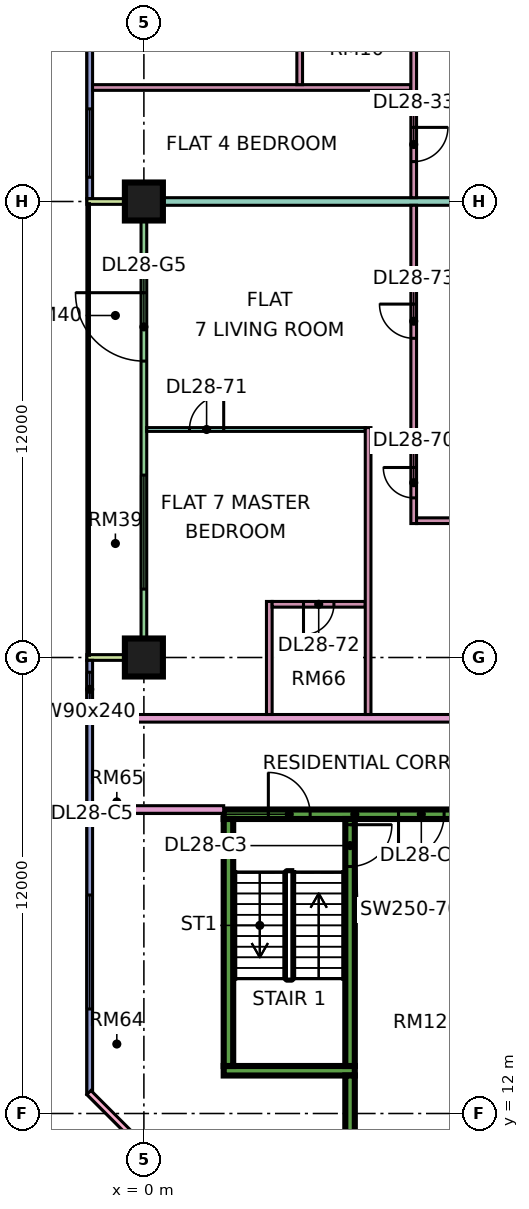
"""IFC4 building model, lengths in metres.
Left out: names, types, materials, properties, quantities, classifications, styles, units other than length and angle.
Written with IfcOpenShell. Run it as: python <this file> out.ifc"""

import sys

from ifc_helpers import new_model, si_unit, direction, frame, frame_2d, origin, origin_2d, place, context, subcontext, project, spatial, rectangle, extrude, element, fill, save


model = new_model("IFC4")
c1 = context("Model", 3, precision=1e-05, world=origin(), true_north=direction((0.0, 1.0)))
c2 = subcontext(c1, "Body", "Model", "MODEL_VIEW")
j1 = project(units=[si_unit("LENGTHUNIT", "METRE"), si_unit("PLANEANGLEUNIT", "RADIAN")], contexts=[c1])
p1 = place(None, origin())
s1 = spatial("IfcSite", under=j1, at=p1, CompositionType="ELEMENT")
p2 = place(p1, origin())
s2 = spatial("IfcBuilding", under=s1, at=p2, CompositionType="ELEMENT")
p3 = place(p2, frame((0.0, 0.0, 121.9)))
s3 = spatial("IfcBuildingStorey", under=s2, at=p3, CompositionType="ELEMENT", Elevation=121.9)
p4 = place(p3, frame((0.0, 24.0, 0.0), z_axis=(0.0, 0.0, 1.0), x_axis=(1.0, 0.0, 0.0)))
e1 = element("IfcColumn", 1, at=p4, inside=s3, PredefinedType="COLUMN", context=c2, shape_type="SweptSolid", body=[
    extrude(rectangle(XDim=1.0, YDim=1.0, at=origin_2d()), origin(), (0.0, 0.0, 1.0), 3.75),
])
p5 = place(p3, frame((0.0, 36.0, 0.0), z_axis=(0.0, 0.0, 1.0), x_axis=(1.0, 0.0, 0.0)))
e2 = element("IfcColumn", 2, at=p5, inside=s3, PredefinedType="COLUMN", context=c2, shape_type="SweptSolid", body=[
    extrude(rectangle(XDim=1.0, YDim=1.0, at=origin_2d()), origin(), (0.0, 0.0, 1.0), 3.75),
])
p6 = place(p3, frame((2.1, 19.875, 0.0), z_axis=(0.0, 0.0, 1.0), x_axis=(1.0, 0.0, 0.0)))
e3 = element("IfcWall", 3, at=p6, inside=s3, PredefinedType="SHEAR", context=c2, shape_type="SweptSolid", body=[
    extrude(rectangle(XDim=6.9, YDim=0.25, at=frame_2d((3.45, 0.0))), origin(), (0.0, 0.0, 1.0), 3.75),
])
p7 = place(p6, frame((1.175, 0.0, 0.0)))
e4 = element("IfcOpeningElement", 4, at=p7, cuts=e3, PredefinedType="OPENING", context=c2, shape_type="SweptSolid", body=[
    extrude(rectangle(XDim=1.1, YDim=2.2, at=frame_2d((0.55, 1.1))), frame((0.0, 0.135, 0.0), z_axis=(0.0, -1.0, 0.0), x_axis=(1.0, 0.0, 0.0)), (0.0, 0.0, 1.0), 0.27),
])
p8 = place(p6, frame((4.6, 0.0, 0.0)))
e5 = element("IfcOpeningElement", 5, at=p8, cuts=e3, PredefinedType="OPENING", context=c2, shape_type="SweptSolid", body=[
    extrude(rectangle(XDim=1.2, YDim=2.2, at=frame_2d((0.6, 1.1))), frame((0.0, 0.135, 0.0), z_axis=(0.0, -1.0, 0.0), x_axis=(1.0, 0.0, 0.0)), (0.0, 0.0, 1.0), 0.27),
])
p9 = place(p3, frame((2.1, 13.125, 0.0), z_axis=(0.0, 0.0, 1.0), x_axis=(1.0, 0.0, 0.0)))
e6 = element("IfcWall", 6, at=p9, inside=s3, PredefinedType="SHEAR", context=c2, shape_type="SweptSolid", body=[
    extrude(rectangle(XDim=3.45, YDim=0.25, at=frame_2d((1.725, 0.0))), origin(), (0.0, 0.0, 1.0), 3.75),
])
p10 = place(p3, frame((2.225, 13.25, 0.0), z_axis=(0.0, 0.0, 1.0), x_axis=(0.0, 1.0, 0.0)))
e7 = element("IfcWall", 7, at=p10, inside=s3, PredefinedType="SHEAR", context=c2, shape_type="SweptSolid", body=[
    extrude(rectangle(XDim=6.5, YDim=0.25, at=frame_2d((3.25, 0.0))), origin(), (0.0, 0.0, 1.0), 3.75),
])
p11 = place(p3, frame((5.425, 13.25, 0.0), z_axis=(0.0, 0.0, 1.0), x_axis=(0.0, 1.0, 0.0)))
e8 = element("IfcWall", 8, at=p11, inside=s3, PredefinedType="SHEAR", context=c2, shape_type="SweptSolid", body=[
    extrude(rectangle(XDim=6.5, YDim=0.25, at=frame_2d((3.25, 0.0))), origin(), (0.0, 0.0, 1.0), 3.75),
])
p12 = place(p11, frame((5.25, 0.0, 0.0)))
e9 = element("IfcOpeningElement", 9, at=p12, cuts=e8, PredefinedType="OPENING", context=c2, shape_type="SweptSolid", body=[
    extrude(rectangle(XDim=1.1, YDim=2.2, at=frame_2d((0.55, 1.1))), frame((0.0, 0.135, 0.0), z_axis=(0.0, -1.0, 0.0), x_axis=(1.0, 0.0, 0.0)), (0.0, 0.0, 1.0), 0.27),
])
p13 = place(p3, frame((5.425, 9.0, 0.0), z_axis=(0.0, 0.0, 1.0), x_axis=(0.0, 1.0, 0.0)))
e10 = element("IfcWall", 10, at=p13, inside=s3, PredefinedType="SHEAR", context=c2, shape_type="SweptSolid", body=[
    extrude(rectangle(XDim=4.0, YDim=0.25, at=frame_2d((2.0, 0.0))), origin(), (0.0, 0.0, 1.0), 3.75),
])
p14 = place(p3, frame((-1.425, 47.925, 0.0), z_axis=(0.0, 0.0, 1.0), x_axis=(0.0, -1.0, 0.0)))
e11 = element("IfcWall", 11, at=p14, inside=s3, PredefinedType="SOLIDWALL", context=c2, shape_type="SweptSolid", body=[
    extrude(rectangle(XDim=11.85, YDim=0.15, at=frame_2d((5.925, 0.0))), origin(), (0.0, 0.0, 1.0), 3.35),
])
p15 = place(p14, frame((0.562, 0.0, 0.45)))
e12 = element("IfcOpeningElement", 12, at=p15, cuts=e11, PredefinedType="OPENING", context=c2, shape_type="SweptSolid", body=[
    extrude(rectangle(XDim=1.8, YDim=2.4, at=frame_2d((0.9, 1.2))), frame((0.0, 0.085, 0.0), z_axis=(0.0, -1.0, 0.0), x_axis=(1.0, 0.0, 0.0)), (0.0, 0.0, 1.0), 0.17),
])
p16 = place(p14, frame((4.425, 0.0, 0.45)))
e13 = element("IfcOpeningElement", 13, at=p16, cuts=e11, PredefinedType="OPENING", context=c2, shape_type="SweptSolid", body=[
    extrude(rectangle(XDim=3.0, YDim=2.4, at=frame_2d((1.5, 1.2))), frame((0.0, 0.085, 0.0), z_axis=(0.0, -1.0, 0.0), x_axis=(1.0, 0.0, 0.0)), (0.0, 0.0, 1.0), 0.17),
])
p17 = place(p14, frame((9.488, 0.0, 0.45)))
e14 = element("IfcOpeningElement", 14, at=p17, cuts=e11, PredefinedType="OPENING", context=c2, shape_type="SweptSolid", body=[
    extrude(rectangle(XDim=1.8, YDim=2.4, at=frame_2d((0.9, 1.2))), frame((0.0, 0.085, 0.0), z_axis=(0.0, -1.0, 0.0), x_axis=(1.0, 0.0, 0.0)), (0.0, 0.0, 1.0), 0.17),
])
p18 = place(p3, frame((0.0, 35.925, 0.0), z_axis=(0.0, 0.0, 1.0), x_axis=(0.0, -1.0, 0.0)))
e15 = element("IfcWall", 15, at=p18, inside=s3, PredefinedType="SOLIDWALL", context=c2, shape_type="SweptSolid", body=[
    extrude(rectangle(XDim=11.85, YDim=0.15, at=frame_2d((5.925, 0.0))), origin(), (0.0, 0.0, 1.0), 3.35),
])
p19 = place(p18, frame((2.325, 0.0, 0.0)))
e16 = element("IfcOpeningElement", 16, at=p19, cuts=e15, PredefinedType="OPENING", context=c2, shape_type="SweptSolid", body=[
    extrude(rectangle(XDim=1.8, YDim=2.4, at=frame_2d((0.9, 1.2))), frame((0.0, 0.085, 0.0), z_axis=(0.0, -1.0, 0.0), x_axis=(1.0, 0.0, 0.0)), (0.0, 0.0, 1.0), 0.17),
])
p20 = place(p18, frame((7.125, 0.0, 0.45)))
e17 = element("IfcOpeningElement", 17, at=p20, cuts=e15, PredefinedType="OPENING", context=c2, shape_type="SweptSolid", body=[
    extrude(rectangle(XDim=3.0, YDim=2.4, at=frame_2d((1.5, 1.2))), frame((0.0, 0.085, 0.0), z_axis=(0.0, -1.0, 0.0), x_axis=(1.0, 0.0, 0.0)), (0.0, 0.0, 1.0), 0.17),
])
for number, where, z_axis, x_axis in (
    (18, (-1.5, 36.0, 0.0), (0.0, 0.0, 1.0), (1.0, 0.0, 0.0)),
    (19, (-1.5, 24.0, 0.0), (0.0, 0.0, 1.0), (1.0, 0.0, 0.0)),
):
    element("IfcWall", number, at=place(p3, frame(where, z_axis=z_axis, x_axis=x_axis)), inside=s3, PredefinedType="SOLIDWALL", context=c2, shape_type="SweptSolid", body=[
        extrude(rectangle(XDim=1.5, YDim=0.15, at=frame_2d((0.75, 0.0))), origin(), (0.0, 0.0, 1.0), 3.35),
    ])
p21 = place(p3, frame((-1.425, 23.925, 0.0), z_axis=(0.0, 0.0, 1.0), x_axis=(0.0, -1.0, 0.0)))
e20 = element("IfcWall", 20, at=p21, inside=s3, PredefinedType="SOLIDWALL", context=c2, shape_type="SweptSolid", body=[
    extrude(rectangle(XDim=11.425, YDim=0.15, at=frame_2d((5.712, 0.0))), origin(), (0.0, 0.0, 1.0), 3.35),
])
p22 = place(p21, frame((0.312, 0.0, 0.45)))
e21 = element("IfcOpeningElement", 21, at=p22, cuts=e20, PredefinedType="OPENING", context=c2, shape_type="SweptSolid", body=[
    extrude(rectangle(XDim=0.9, YDim=2.4, at=frame_2d((0.45, 1.2))), frame((0.0, 0.085, 0.0), z_axis=(0.0, -1.0, 0.0), x_axis=(1.0, 0.0, 0.0)), (0.0, 0.0, 1.0), 0.17),
])
p23 = place(p21, frame((6.175, 0.0, 0.45)))
e22 = element("IfcOpeningElement", 22, at=p23, cuts=e20, PredefinedType="OPENING", context=c2, shape_type="SweptSolid", body=[
    extrude(rectangle(XDim=3.0, YDim=2.4, at=frame_2d((1.5, 1.2))), frame((0.0, 0.085, 0.0), z_axis=(0.0, -1.0, 0.0), x_axis=(1.0, 0.0, 0.0)), (0.0, 0.0, 1.0), 0.17),
])
p24 = place(p3, frame((-1.447, 12.553, 0.0), z_axis=(0.0, 0.0, 1.0), x_axis=(0.707106781187, -0.707106781187, 0.0)))
e23 = element("IfcWall", 23, at=p24, inside=s3, PredefinedType="SOLIDWALL", context=c2, shape_type="SweptSolid", body=[
    extrude(rectangle(XDim=19.799, YDim=0.15, at=frame_2d((9.899, 0.0))), origin(), (0.0, 0.0, 1.0), 3.35),
])
p25 = place(p24, frame((2.212, 0.0, 0.45)))
e24 = element("IfcOpeningElement", 24, at=p25, cuts=e23, PredefinedType="OPENING", context=c2, shape_type="SweptSolid", body=[
    extrude(rectangle(XDim=3.0, YDim=2.4, at=frame_2d((1.5, 1.2))), frame((0.0, 0.085, 0.0), z_axis=(0.0, -1.0, 0.0), x_axis=(1.0, 0.0, 0.0)), (0.0, 0.0, 1.0), 0.17),
])
p26 = place(p24, frame((10.216, 0.0, 0.45)))
e25 = element("IfcOpeningElement", 25, at=p26, cuts=e23, PredefinedType="OPENING", context=c2, shape_type="SweptSolid", body=[
    extrude(rectangle(XDim=3.0, YDim=2.4, at=frame_2d((1.5, 1.2))), frame((0.0, 0.085, 0.0), z_axis=(0.0, -1.0, 0.0), x_axis=(1.0, 0.0, 0.0)), (0.0, 0.0, 1.0), 0.17),
])
p27 = place(p3, frame((-1.351, 39.0, 0.0), z_axis=(0.0, 0.0, 1.0), x_axis=(1.0, 0.0, 0.0)))
e26 = element("IfcWall", 26, at=p27, inside=s3, PredefinedType="PARTITIONING", context=c2, shape_type="SweptSolid", body=[
    extrude(rectangle(XDim=8.376, YDim=0.15, at=frame_2d((4.188, 0.0))), origin(), (0.0, 0.0, 1.0), 3.35),
])
p28 = place(p3, frame((-1.35, 20.0, 0.0), z_axis=(0.0, 0.0, 1.0), x_axis=(1.0, 0.0, 0.0)))
e27 = element("IfcWall", 27, at=p28, inside=s3, PredefinedType="PARTITIONING", context=c2, shape_type="SweptSolid", body=[
    extrude(rectangle(XDim=3.45, YDim=0.2, at=frame_2d((1.725, 0.0))), origin(), (0.0, 0.0, 1.0), 3.35),
])
p29 = place(p3, frame((-1.35, 22.4, 0.0), z_axis=(0.0, 0.0, 1.0), x_axis=(1.0, 0.0, 0.0)))
e28 = element("IfcWall", 28, at=p29, inside=s3, PredefinedType="PARTITIONING", context=c2, shape_type="SweptSolid", body=[
    extrude(rectangle(XDim=13.75, YDim=0.2, at=frame_2d((6.875, 0.0))), origin(), (0.0, 0.0, 1.0), 3.35),
])
e29 = element("IfcWall", 29, at=p5, inside=s3, PredefinedType="PARTITIONING", context=c2, shape_type="SweptSolid", body=[
    extrude(rectangle(XDim=12.4, YDim=0.2, at=frame_2d((6.2, 0.0))), origin(), (0.0, 0.0, 1.0), 3.35),
])
p30 = place(p3, frame((0.074, 30.0, 0.0), z_axis=(0.0, 0.0, 1.0), x_axis=(1.0, 0.0, 0.0)))
e30 = element("IfcWall", 30, at=p30, inside=s3, PredefinedType="PARTITIONING", context=c2, shape_type="SweptSolid", body=[
    extrude(rectangle(XDim=5.751, YDim=0.1, at=frame_2d((2.875, 0.0))), origin(), (0.0, 0.0, 1.0), 3.35),
])
p31 = place(p30, frame((1.126, 0.0, 0.0)))
e31 = element("IfcOpeningElement", 31, at=p31, cuts=e30, PredefinedType="OPENING", context=c2, shape_type="SweptSolid", body=[
    extrude(rectangle(XDim=0.9, YDim=2.1, at=frame_2d((0.45, 1.05))), frame((0.0, 0.06, 0.0), z_axis=(0.0, -1.0, 0.0), x_axis=(1.0, 0.0, 0.0)), (0.0, 0.0, 1.0), 0.12),
])
p32 = place(p3, frame((3.3, 22.5, 0.0), z_axis=(0.0, 0.0, 1.0), x_axis=(0.0, 1.0, 0.0)))
e32 = element("IfcWall", 32, at=p32, inside=s3, PredefinedType="PARTITIONING", context=c2, shape_type="SweptSolid", body=[
    extrude(rectangle(XDim=2.975, YDim=0.15, at=frame_2d((1.488, 0.0))), origin(), (0.0, 0.0, 1.0), 3.35),
])
p33 = place(p3, frame((3.375, 25.4, 0.0), z_axis=(0.0, 0.0, 1.0), x_axis=(1.0, 0.0, 0.0)))
e33 = element("IfcWall", 33, at=p33, inside=s3, PredefinedType="PARTITIONING", context=c2, shape_type="SweptSolid", body=[
    extrude(rectangle(XDim=2.45, YDim=0.15, at=frame_2d((1.225, 0.0))), origin(), (0.0, 0.0, 1.0), 3.35),
])
p34 = place(p33, frame((0.825, 0.0, 0.0)))
e34 = element("IfcOpeningElement", 34, at=p34, cuts=e33, PredefinedType="OPENING", context=c2, shape_type="SweptSolid", body=[
    extrude(rectangle(XDim=0.8, YDim=2.1, at=frame_2d((0.4, 1.05))), frame((0.0, 0.085, 0.0), z_axis=(0.0, -1.0, 0.0), x_axis=(1.0, 0.0, 0.0)), (0.0, 0.0, 1.0), 0.17),
])
p35 = place(p3, frame((4.1, 39.075, 0.0), z_axis=(0.0, 0.0, 1.0), x_axis=(0.0, 1.0, 0.0)))
e35 = element("IfcWall", 35, at=p35, inside=s3, PredefinedType="PARTITIONING", context=c2, shape_type="SweptSolid", body=[
    extrude(rectangle(XDim=3.0, YDim=0.15, at=frame_2d((1.5, 0.0))), origin(), (0.0, 0.0, 1.0), 3.35),
])
p36 = place(p3, frame((5.9, 22.5, 0.0), z_axis=(0.0, 0.0, 1.0), x_axis=(0.0, 1.0, 0.0)))
e36 = element("IfcWall", 36, at=p36, inside=s3, PredefinedType="PARTITIONING", context=c2, shape_type="SweptSolid", body=[
    extrude(rectangle(XDim=7.55, YDim=0.15, at=frame_2d((3.775, 0.0))), origin(), (0.0, 0.0, 1.0), 3.35),
])
p37 = place(p3, frame((7.1, 27.525, 0.0), z_axis=(0.0, 0.0, 1.0), x_axis=(0.0, 1.0, 0.0)))
e37 = element("IfcWall", 37, at=p37, inside=s3, PredefinedType="PARTITIONING", context=c2, shape_type="SweptSolid", body=[
    extrude(rectangle(XDim=8.375, YDim=0.15, at=frame_2d((4.188, 0.0))), origin(), (0.0, 0.0, 1.0), 3.35),
])
p38 = place(p37, frame((0.675, 0.0, 0.0)))
e38 = element("IfcOpeningElement", 38, at=p38, cuts=e37, PredefinedType="OPENING", context=c2, shape_type="SweptSolid", body=[
    extrude(rectangle(XDim=0.8, YDim=2.1, at=frame_2d((0.4, 1.05))), frame((0.0, 0.085, 0.0), z_axis=(0.0, -1.0, 0.0), x_axis=(1.0, 0.0, 0.0)), (0.0, 0.0, 1.0), 0.17),
])
p39 = place(p37, frame((4.875, 0.0, 0.0)))
e39 = element("IfcOpeningElement", 39, at=p39, cuts=e37, PredefinedType="OPENING", context=c2, shape_type="SweptSolid", body=[
    extrude(rectangle(XDim=0.9, YDim=2.1, at=frame_2d((0.45, 1.05))), frame((0.0, 0.085, 0.0), z_axis=(0.0, -1.0, 0.0), x_axis=(1.0, 0.0, 0.0)), (0.0, 0.0, 1.0), 0.17),
])
p40 = place(p3, frame((7.1, 36.1, 0.0), z_axis=(0.0, 0.0, 1.0), x_axis=(0.0, 1.0, 0.0)))
e40 = element("IfcWall", 40, at=p40, inside=s3, PredefinedType="PARTITIONING", context=c2, shape_type="SweptSolid", body=[
    extrude(rectangle(XDim=26.826, YDim=0.15, at=frame_2d((13.413, 0.0))), origin(), (0.0, 0.0, 1.0), 3.35),
])
p41 = place(p40, frame((0.95, 0.0, 0.0)))
e41 = element("IfcOpeningElement", 41, at=p41, cuts=e40, PredefinedType="OPENING", context=c2, shape_type="SweptSolid", body=[
    extrude(rectangle(XDim=0.9, YDim=2.1, at=frame_2d((0.45, 1.05))), frame((0.0, 0.085, 0.0), z_axis=(0.0, -1.0, 0.0), x_axis=(1.0, 0.0, 0.0)), (0.0, 0.0, 1.0), 0.17),
])
p42 = place(p40, frame((9.95, 0.0, 0.0)))
e42 = element("IfcOpeningElement", 42, at=p42, cuts=e40, PredefinedType="OPENING", context=c2, shape_type="SweptSolid", body=[
    extrude(rectangle(XDim=0.9, YDim=2.1, at=frame_2d((0.45, 1.05))), frame((0.0, 0.085, 0.0), z_axis=(0.0, -1.0, 0.0), x_axis=(1.0, 0.0, 0.0)), (0.0, 0.0, 1.0), 0.17),
])
p43 = place(p40, frame((6.95, 0.0, 0.0)))
e43 = element("IfcOpeningElement", 43, at=p43, cuts=e40, PredefinedType="OPENING", context=c2, shape_type="SweptSolid", body=[
    extrude(rectangle(XDim=0.9, YDim=2.1, at=frame_2d((0.45, 1.05))), frame((0.0, 0.085, 0.0), z_axis=(0.0, -1.0, 0.0), x_axis=(1.0, 0.0, 0.0)), (0.0, 0.0, 1.0), 0.17),
])
p44 = place(p40, frame((20.45, 0.0, 0.0)))
e44 = element("IfcOpeningElement", 44, at=p44, cuts=e40, PredefinedType="OPENING", context=c2, shape_type="SweptSolid", body=[
    extrude(rectangle(XDim=0.9, YDim=2.1, at=frame_2d((0.45, 1.05))), frame((0.0, 0.085, 0.0), z_axis=(0.0, -1.0, 0.0), x_axis=(1.0, 0.0, 0.0)), (0.0, 0.0, 1.0), 0.17),
])
p45 = place(p40, frame((25.8, 0.0, 0.0)))
e45 = element("IfcOpeningElement", 45, at=p45, cuts=e40, PredefinedType="OPENING", context=c2, shape_type="SweptSolid", body=[
    extrude(rectangle(XDim=0.8, YDim=2.1, at=frame_2d((0.4, 1.05))), frame((0.0, 0.085, 0.0), z_axis=(0.0, -1.0, 0.0), x_axis=(1.0, 0.0, 0.0)), (0.0, 0.0, 1.0), 0.17),
])
p46 = place(p40, frame((12.55, 0.0, 0.0)))
e46 = element("IfcOpeningElement", 46, at=p46, cuts=e40, PredefinedType="OPENING", context=c2, shape_type="SweptSolid", body=[
    extrude(rectangle(XDim=1.6, YDim=2.1, at=frame_2d((0.8, 1.05))), frame((0.0, 0.085, 0.0), z_axis=(0.0, -1.0, 0.0), x_axis=(1.0, 0.0, 0.0)), (0.0, 0.0, 1.0), 0.17),
])
p47 = place(p40, frame((15.95, 0.0, 0.0)))
e47 = element("IfcOpeningElement", 47, at=p47, cuts=e40, PredefinedType="OPENING", context=c2, shape_type="SweptSolid", body=[
    extrude(rectangle(XDim=0.9, YDim=2.1, at=frame_2d((0.45, 1.05))), frame((0.0, 0.085, 0.0), z_axis=(0.0, -1.0, 0.0), x_axis=(1.0, 0.0, 0.0)), (0.0, 0.0, 1.0), 0.17),
])
for number, where, z_axis, x_axis in (
    (48, (7.175, 27.6, 0.0), (0.0, 0.0, 1.0), (1.0, 0.0, 0.0)),
    (49, (7.175, 29.7, 0.0), (0.0, 0.0, 1.0), (1.0, 0.0, 0.0)),
):
    element("IfcWall", number, at=place(p3, frame(where, z_axis=z_axis, x_axis=x_axis)), inside=s3, PredefinedType="PARTITIONING", context=c2, shape_type="SweptSolid", body=[
        extrude(rectangle(XDim=5.225, YDim=0.15, at=frame_2d((2.612, 0.0))), origin(), (0.0, 0.0, 1.0), 3.35),
    ])
p48 = place(p17, origin())
e50 = element("IfcWindow", 50, at=p48, inside=s3, PartitioningType="SINGLE_PANEL", PredefinedType="WINDOW", context=c2, shape_type="SweptSolid", body=[
    extrude(rectangle(XDim=1.8, YDim=2.4, at=frame_2d((0.9, 1.2))), frame((0.0, 0.03, 0.0), z_axis=(0.0, -1.0, 0.0), x_axis=(1.0, 0.0, 0.0)), (0.0, 0.0, 1.0), 0.06),
])
fill(e14, e50)
p49 = place(p19, frame((1.8, 0.0, 0.0), z_axis=(0.0, 0.0, 1.0), x_axis=(-1.0, 0.0, 0.0)))
e51 = element("IfcDoor", 51, at=p49, inside=s3, OperationType="DOUBLE_DOOR_SINGLE_SWING", PredefinedType="DOOR", context=c2, shape_type="SweptSolid", body=[
    extrude(rectangle(XDim=1.8, YDim=2.4, at=frame_2d((0.9, 1.2))), frame((0.0, 0.025, 0.0), z_axis=(0.0, -1.0, 0.0), x_axis=(1.0, 0.0, 0.0)), (0.0, 0.0, 1.0), 0.05),
])
fill(e16, e51)
p50 = place(p20, origin())
e52 = element("IfcWindow", 52, at=p50, inside=s3, PartitioningType="SINGLE_PANEL", PredefinedType="WINDOW", context=c2, shape_type="SweptSolid", body=[
    extrude(rectangle(XDim=3.0, YDim=2.4, at=frame_2d((1.5, 1.2))), frame((0.0, 0.03, 0.0), z_axis=(0.0, -1.0, 0.0), x_axis=(1.0, 0.0, 0.0)), (0.0, 0.0, 1.0), 0.06),
])
fill(e17, e52)
p51 = place(p22, origin())
e53 = element("IfcWindow", 53, at=p51, inside=s3, PartitioningType="SINGLE_PANEL", PredefinedType="WINDOW", context=c2, shape_type="SweptSolid", body=[
    extrude(rectangle(XDim=0.9, YDim=2.4, at=frame_2d((0.45, 1.2))), frame((0.0, 0.03, 0.0), z_axis=(0.0, -1.0, 0.0), x_axis=(1.0, 0.0, 0.0)), (0.0, 0.0, 1.0), 0.06),
])
fill(e21, e53)
p52 = place(p23, origin())
e54 = element("IfcWindow", 54, at=p52, inside=s3, PartitioningType="SINGLE_PANEL", PredefinedType="WINDOW", context=c2, shape_type="SweptSolid", body=[
    extrude(rectangle(XDim=3.0, YDim=2.4, at=frame_2d((1.5, 1.2))), frame((0.0, 0.03, 0.0), z_axis=(0.0, -1.0, 0.0), x_axis=(1.0, 0.0, 0.0)), (0.0, 0.0, 1.0), 0.06),
])
fill(e22, e54)
p53 = place(p12, origin())
e55 = element("IfcDoor", 55, at=p53, inside=s3, OperationType="SINGLE_SWING_RIGHT", PredefinedType="DOOR", context=c2, shape_type="SweptSolid", body=[
    extrude(rectangle(XDim=1.1, YDim=2.2, at=frame_2d((0.55, 1.1))), frame((0.0, 0.025, 0.0), z_axis=(0.0, -1.0, 0.0), x_axis=(1.0, 0.0, 0.0)), (0.0, 0.0, 1.0), 0.05),
])
fill(e9, e55)
p54 = place(p7, origin())
e56 = element("IfcDoor", 56, at=p54, inside=s3, OperationType="SINGLE_SWING_LEFT", PredefinedType="DOOR", context=c2, shape_type="SweptSolid", body=[
    extrude(rectangle(XDim=1.1, YDim=2.2, at=frame_2d((0.55, 1.1))), frame((0.0, 0.025, 0.0), z_axis=(0.0, -1.0, 0.0), x_axis=(1.0, 0.0, 0.0)), (0.0, 0.0, 1.0), 0.05),
])
fill(e4, e56)
p55 = place(p8, frame((1.2, 0.0, 0.0), z_axis=(0.0, 0.0, 1.0), x_axis=(-1.0, 0.0, 0.0)))
e57 = element("IfcDoor", 57, at=p55, inside=s3, OperationType="SINGLE_SWING_LEFT", PredefinedType="DOOR", context=c2, shape_type="SweptSolid", body=[
    extrude(rectangle(XDim=1.2, YDim=2.2, at=frame_2d((0.6, 1.1))), frame((0.0, 0.025, 0.0), z_axis=(0.0, -1.0, 0.0), x_axis=(1.0, 0.0, 0.0)), (0.0, 0.0, 1.0), 0.05),
])
fill(e5, e57)
p56 = place(p41, origin())
e58 = element("IfcDoor", 58, at=p56, inside=s3, OperationType="SINGLE_SWING_RIGHT", PredefinedType="DOOR", context=c2, shape_type="SweptSolid", body=[
    extrude(rectangle(XDim=0.9, YDim=2.1, at=frame_2d((0.45, 1.05))), frame((0.0, 0.025, 0.0), z_axis=(0.0, -1.0, 0.0), x_axis=(1.0, 0.0, 0.0)), (0.0, 0.0, 1.0), 0.05),
])
fill(e41, e58)
p57 = place(p38, frame((0.8, 0.0, 0.0), z_axis=(0.0, 0.0, 1.0), x_axis=(-1.0, 0.0, 0.0)))
e59 = element("IfcDoor", 59, at=p57, inside=s3, OperationType="SINGLE_SWING_RIGHT", PredefinedType="DOOR", context=c2, shape_type="SweptSolid", body=[
    extrude(rectangle(XDim=0.8, YDim=2.1, at=frame_2d((0.4, 1.05))), frame((0.0, 0.025, 0.0), z_axis=(0.0, -1.0, 0.0), x_axis=(1.0, 0.0, 0.0)), (0.0, 0.0, 1.0), 0.05),
])
fill(e38, e59)
p58 = place(p31, frame((0.9, 0.0, 0.0), z_axis=(0.0, 0.0, 1.0), x_axis=(-1.0, 0.0, 0.0)))
e60 = element("IfcDoor", 60, at=p58, inside=s3, OperationType="SINGLE_SWING_RIGHT", PredefinedType="DOOR", context=c2, shape_type="SweptSolid", body=[
    extrude(rectangle(XDim=0.9, YDim=2.1, at=frame_2d((0.45, 1.05))), frame((0.0, 0.025, 0.0), z_axis=(0.0, -1.0, 0.0), x_axis=(1.0, 0.0, 0.0)), (0.0, 0.0, 1.0), 0.05),
])
fill(e31, e60)
p59 = place(p34, frame((0.8, 0.0, 0.0), z_axis=(0.0, 0.0, 1.0), x_axis=(-1.0, 0.0, 0.0)))
e61 = element("IfcDoor", 61, at=p59, inside=s3, OperationType="SINGLE_SWING_LEFT", PredefinedType="DOOR", context=c2, shape_type="SweptSolid", body=[
    extrude(rectangle(XDim=0.8, YDim=2.1, at=frame_2d((0.4, 1.05))), frame((0.0, 0.025, 0.0), z_axis=(0.0, -1.0, 0.0), x_axis=(1.0, 0.0, 0.0)), (0.0, 0.0, 1.0), 0.05),
])
fill(e34, e61)
p60 = place(p39, frame((0.9, 0.0, 0.0), z_axis=(0.0, 0.0, 1.0), x_axis=(-1.0, 0.0, 0.0)))
e62 = element("IfcDoor", 62, at=p60, inside=s3, OperationType="SINGLE_SWING_RIGHT", PredefinedType="DOOR", context=c2, shape_type="SweptSolid", body=[
    extrude(rectangle(XDim=0.9, YDim=2.1, at=frame_2d((0.45, 1.05))), frame((0.0, 0.025, 0.0), z_axis=(0.0, -1.0, 0.0), x_axis=(1.0, 0.0, 0.0)), (0.0, 0.0, 1.0), 0.05),
])
fill(e39, e62)
save(model, sys.argv[1])
